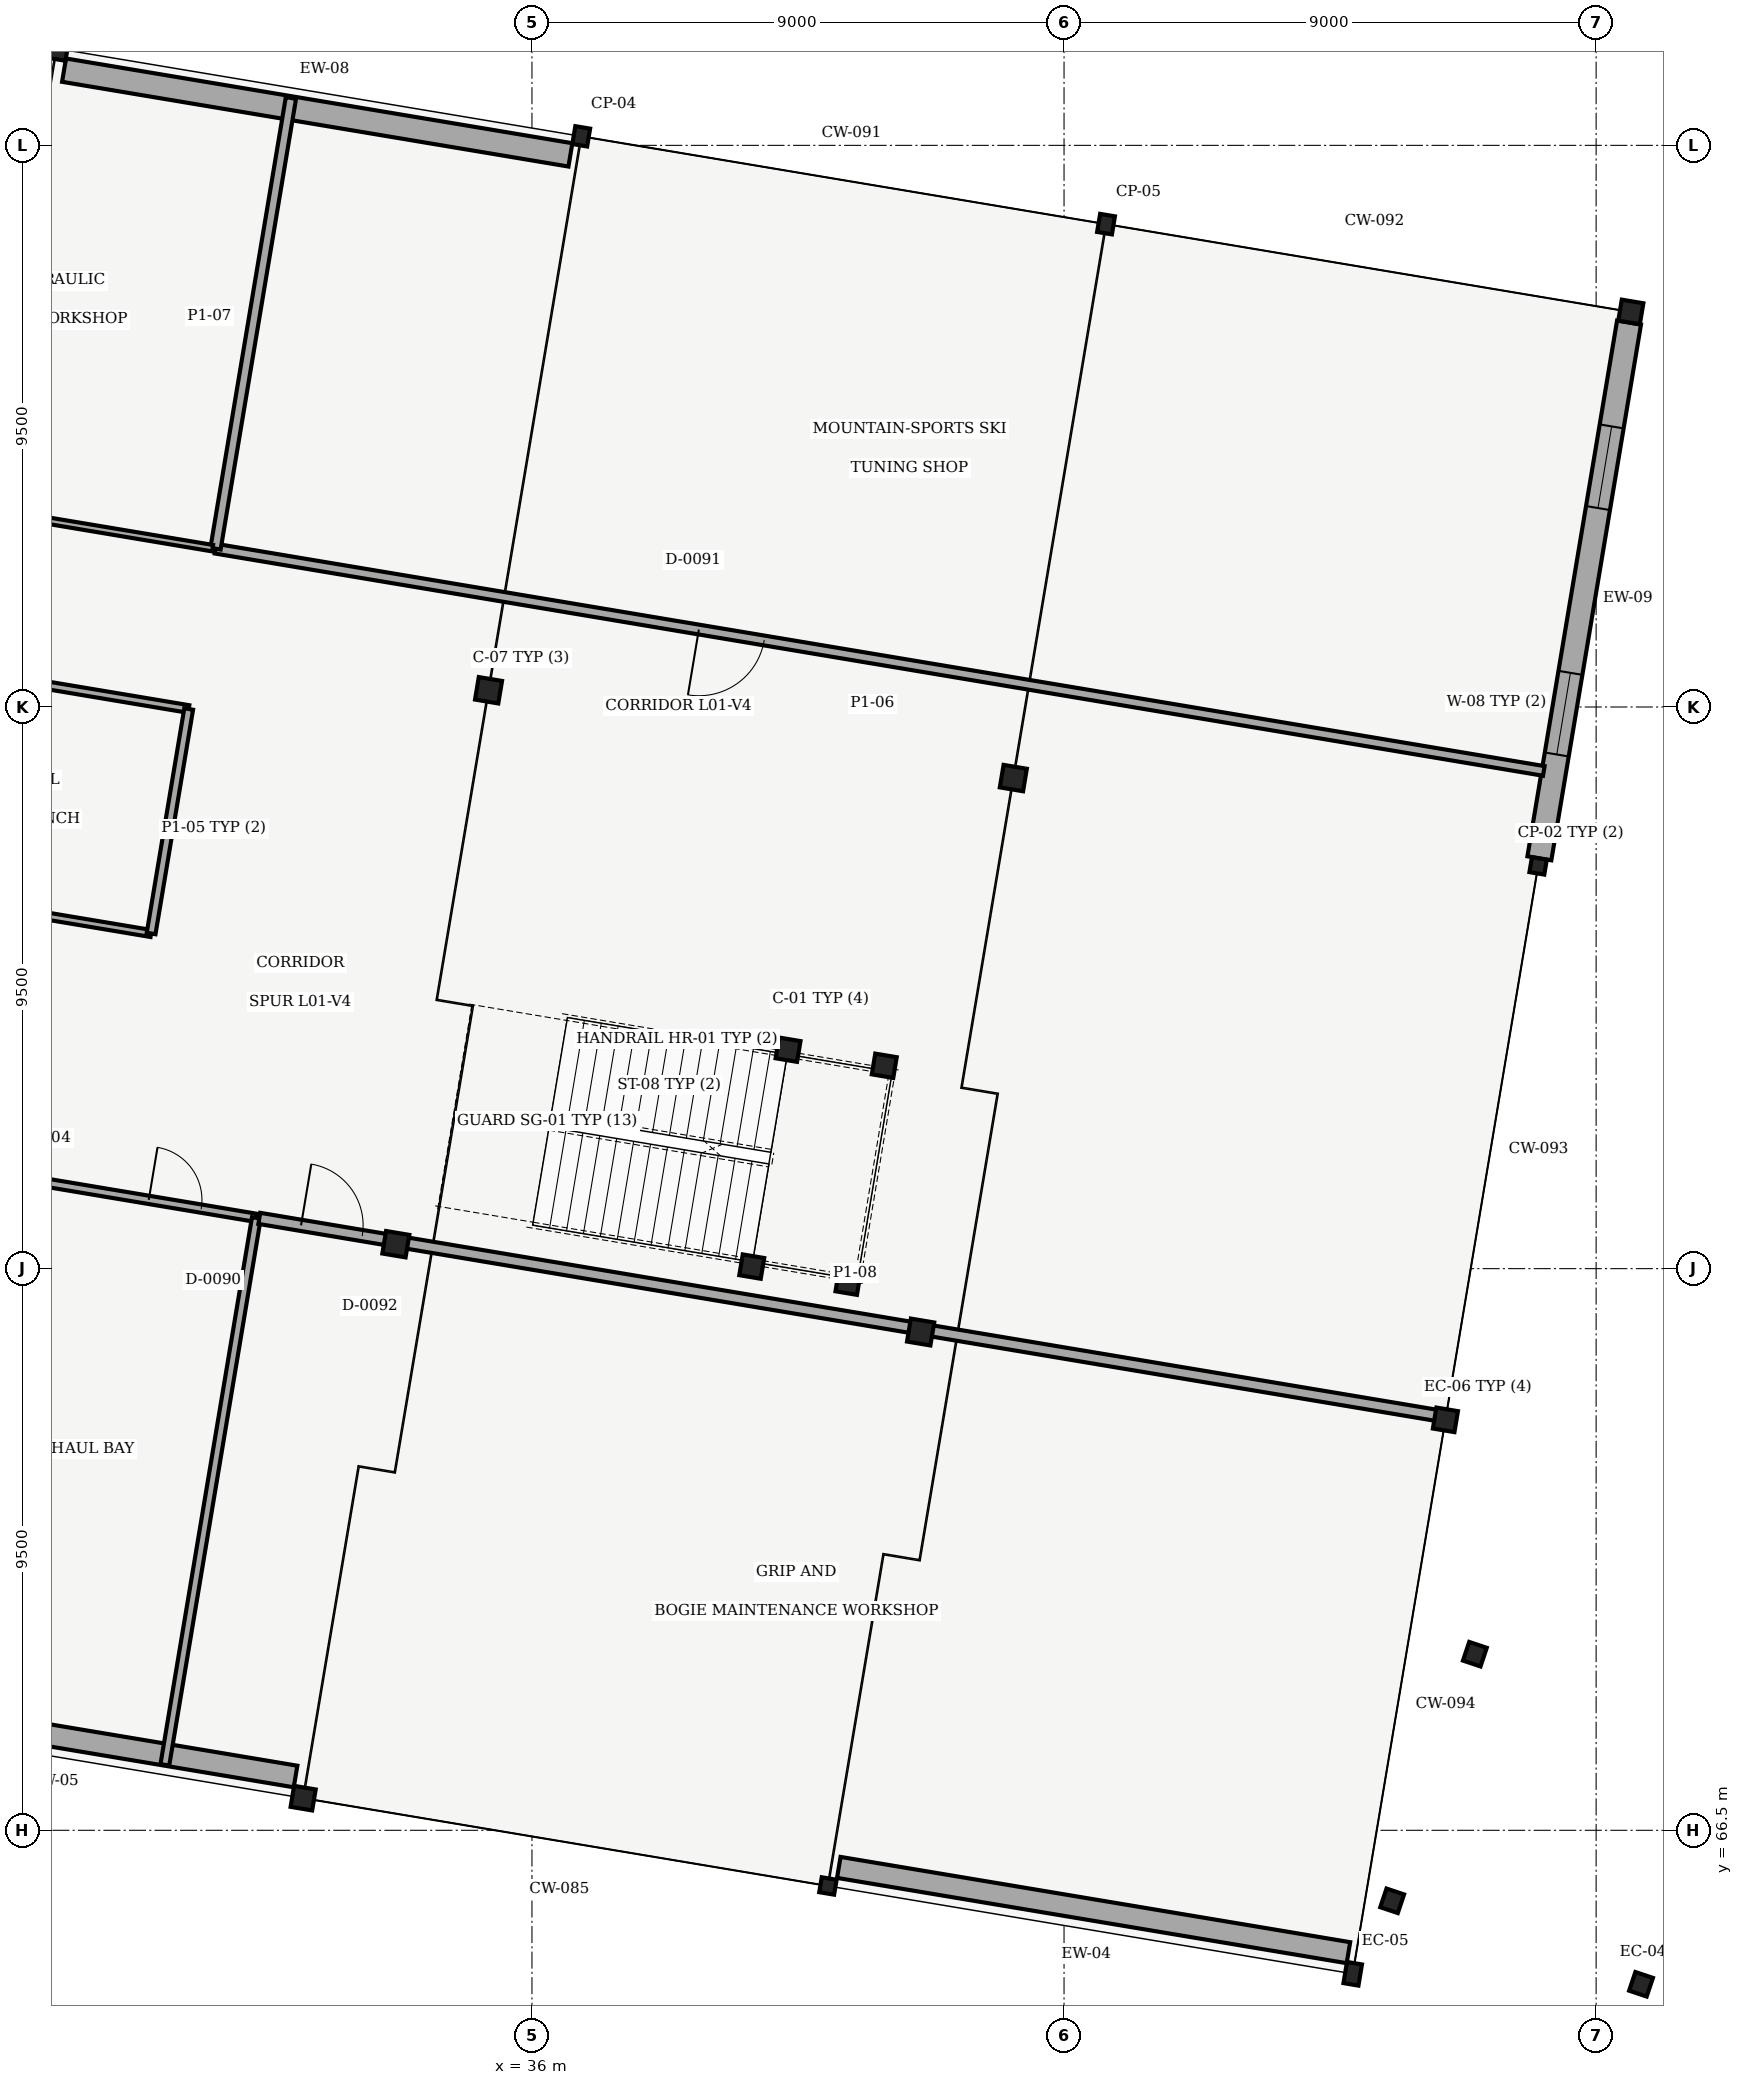
"""IFC4 building model, lengths in metres.
Left out: names, types, materials, properties, quantities, classifications, styles, units other than length and angle.
Written with IfcOpenShell. Run it as: python <this file> out.ifc"""

import sys

from ifc_helpers import new_model, si_unit, direction, frame, frame_2d, origin, origin_with_axes, origin_2d, place, context, subcontext, project, spatial, rectangle, i_section, extrude, element, fill, save


model = new_model("IFC4")
c1 = context("Model", 3, precision=1e-05, world=origin(), true_north=direction((0.0, 1.0)))
c2 = subcontext(c1, "Body", "Model", "MODEL_VIEW")
j1 = project(units=[si_unit("LENGTHUNIT", "METRE"), si_unit("PLANEANGLEUNIT", "RADIAN")], contexts=[c1])
p1 = place(None, origin())
s1 = spatial("IfcSite", under=j1, at=p1, CompositionType="ELEMENT")
p2 = place(p1, origin())
s2 = spatial("IfcBuilding", under=s1, at=p2, CompositionType="ELEMENT")
p3 = place(p2, frame((0.0, 0.0, 4.8)))
s3 = spatial("IfcBuildingStorey", under=s2, at=p3, CompositionType="ELEMENT", Elevation=4.8)
for number, where, z_axis, x_axis in (
    (1, (27.957, 96.638, 0.0), (0.0, 0.0, 1.0), (0.986, -0.165, 0.0)),
    (2, (32.13, 67.044, 0.0), (0.0, 0.0, 1.0), (0.986, -0.165, 0.0)),
):
    element("IfcColumn", number, at=place(p3, frame(where, z_axis=z_axis, x_axis=x_axis)), inside=s3, PredefinedType="COLUMN", context=c2, shape_type="SweptSolid", body=[
        extrude(i_section(OverallWidth=0.37, OverallDepth=0.36, WebThickness=0.012, FlangeThickness=0.02, FilletRadius=0.015, at=origin_2d()), origin(), (0.0, 0.0, 1.0), 4.8),
    ])
for number, where, z_axis, x_axis in (
    (3, (33.698, 76.413, 0.0), (0.0, 0.0, 1.0), (0.986, -0.165, 0.0)),
    (4, (35.266, 85.783, 0.0), (0.0, 0.0, 1.0), (0.986, -0.165, 0.0)),
):
    element("IfcColumn", number, at=place(p3, frame(where, z_axis=z_axis, x_axis=x_axis)), inside=s3, PredefinedType="COLUMN", context=c2, shape_type="SweptSolid", body=[
        extrude(i_section(OverallWidth=0.399, OverallDepth=0.386, WebThickness=0.021, FlangeThickness=0.033, FilletRadius=0.015, at=origin_2d()), origin(), (0.0, 0.0, 1.0), 4.8),
    ])
p4 = place(p3, frame((36.833, 95.153, 0.0), z_axis=(0.0, 0.0, 1.0), x_axis=(0.986285601537, -0.165047605861, 0.0)))
e5 = element("IfcColumn", 5, at=p4, inside=s3, PredefinedType="PILASTER", context=c2, shape_type="SweptSolid", body=[
    extrude(i_section(OverallWidth=0.254, OverallDepth=0.306, WebThickness=0.009, FlangeThickness=0.015, FilletRadius=0.011, at=origin_2d()), origin(), (0.0, 0.0, 1.0), 4.8),
])
p5 = place(p3, frame((41.006, 65.558, 0.0), z_axis=(0.0, 0.0, 1.0), x_axis=(0.986285601537, -0.165047605861, 0.0)))
e6 = element("IfcColumn", 6, at=p5, inside=s3, PredefinedType="PILASTER", context=c2, shape_type="SweptSolid", body=[
    extrude(i_section(OverallWidth=0.255, OverallDepth=0.256, WebThickness=0.01, FlangeThickness=0.016, FilletRadius=0.009, at=origin_2d()), origin(), (0.0, 0.0, 1.0), 4.8),
])
p6 = place(p3, frame((42.574, 74.928, 0.0), z_axis=(0.0, 0.0, 1.0), x_axis=(0.986285601537, -0.165047605861, 0.0)))
e7 = element("IfcColumn", 7, at=p6, inside=s3, PredefinedType="COLUMN", context=c2, shape_type="SweptSolid", body=[
    extrude(i_section(OverallWidth=0.401, OverallDepth=0.394, WebThickness=0.023, FlangeThickness=0.037, FilletRadius=0.015, at=origin_2d()), origin(), (0.0, 0.0, 1.0), 4.8),
])
p7 = place(p3, frame((44.142, 84.298, 0.0), z_axis=(0.0, 0.0, 1.0), x_axis=(0.986285601537, -0.165047605861, 0.0)))
e8 = element("IfcColumn", 8, at=p7, inside=s3, PredefinedType="COLUMN", context=c2, shape_type="SweptSolid", body=[
    extrude(i_section(OverallWidth=0.399, OverallDepth=0.386, WebThickness=0.021, FlangeThickness=0.033, FilletRadius=0.015, at=origin_2d()), origin(), (0.0, 0.0, 1.0), 4.8),
])
p8 = place(p3, frame((45.71, 93.667, 0.0), z_axis=(0.0, 0.0, 1.0), x_axis=(0.986285601537, -0.165047605861, 0.0)))
e9 = element("IfcColumn", 9, at=p8, inside=s3, PredefinedType="PILASTER", context=c2, shape_type="SweptSolid", body=[
    extrude(i_section(OverallWidth=0.254, OverallDepth=0.31, WebThickness=0.009, FlangeThickness=0.016, FilletRadius=0.011, at=origin_2d()), origin(), (0.0, 0.0, 1.0), 4.8),
])
p9 = place(p3, frame((49.883, 64.073, 0.0), z_axis=(0.0, 0.0, 1.0), x_axis=(0.986285601537, -0.165047605861, 0.0)))
e10 = element("IfcColumn", 10, at=p9, inside=s3, PredefinedType="COLUMN", context=c2, shape_type="SweptSolid", body=[
    extrude(i_section(OverallWidth=0.257, OverallDepth=0.363, WebThickness=0.013, FlangeThickness=0.022, FilletRadius=0.015, at=origin_2d()), origin(), (0.0, 0.0, 1.0), 4.8),
])
p10 = place(p3, frame((51.451, 73.443, 0.0), z_axis=(0.0, 0.0, 1.0), x_axis=(0.986285601537, -0.165047605861, 0.0)))
e11 = element("IfcColumn", 11, at=p10, inside=s3, PredefinedType="COLUMN", context=c2, shape_type="SweptSolid", body=[
    extrude(i_section(OverallWidth=0.37, OverallDepth=0.36, WebThickness=0.012, FlangeThickness=0.02, FilletRadius=0.015, at=origin_2d()), origin(), (0.0, 0.0, 1.0), 4.8),
])
p11 = place(p3, frame((53.019, 82.812, 0.0), z_axis=(0.0, 0.0, 1.0), x_axis=(0.986285601537, -0.165047605861, 0.0)))
e12 = element("IfcColumn", 12, at=p11, inside=s3, PredefinedType="PILASTER", context=c2, shape_type="SweptSolid", body=[
    extrude(i_section(OverallWidth=0.255, OverallDepth=0.256, WebThickness=0.01, FlangeThickness=0.016, FilletRadius=0.009, at=origin_2d()), origin(), (0.0, 0.0, 1.0), 4.8),
])
p12 = place(p3, frame((54.587, 92.182, 0.0), z_axis=(0.0, 0.0, 1.0), x_axis=(0.986285601537, -0.165047605861, 0.0)))
e13 = element("IfcColumn", 13, at=p12, inside=s3, PredefinedType="COLUMN", context=c2, shape_type="SweptSolid", body=[
    extrude(i_section(OverallWidth=0.37, OverallDepth=0.36, WebThickness=0.012, FlangeThickness=0.02, FilletRadius=0.015, at=origin_2d()), origin(), (0.0, 0.0, 1.0), 4.8),
])
for number, where, z_axis, x_axis in (
    (14, (50.55, 65.307, 0.0), (0.0, 0.0, 1.0), (0.948, -0.318, 0.0)),
    (15, (51.949, 69.479, 0.0), (0.0, 0.0, 1.0), (0.948, -0.318, 0.0)),
    (16, (54.76, 63.895, 0.0), (0.0, 0.0, 1.0), (0.948, -0.318, 0.0)),
):
    element("IfcColumn", number, at=place(p3, frame(where, z_axis=z_axis, x_axis=x_axis)), inside=s3, PredefinedType="COLUMN", context=c2, shape_type="SweptSolid", body=[
        extrude(i_section(OverallWidth=0.313, OverallDepth=0.333, WebThickness=0.018, FlangeThickness=0.028, FilletRadius=0.013, at=origin_2d()), origin(), (0.0, 0.0, 1.0), 4.8),
    ])
p13 = place(p3, frame((49.81, 64.43, 0.0), z_axis=(0.0, 0.0, 1.0), x_axis=(-0.986283477209, 0.165060299842, 0.0)))
e17 = element("IfcWall", 17, at=p13, inside=s3, PredefinedType="SOLIDWALL", context=c2, shape_type="SweptSolid", body=[
    extrude(rectangle(XDim=8.74, YDim=0.36, at=frame_2d((4.37, 0.0))), origin(), (0.0, 0.0, 1.0), 3.4),
])
p14 = place(p3, frame((32.001, 67.41, 0.0), z_axis=(0.0, 0.0, 1.0), x_axis=(-0.986284271158, 0.165055555699, 0.0)))
e18 = element("IfcWall", 18, at=p14, inside=s3, PredefinedType="SOLIDWALL", context=c2, shape_type="SweptSolid", body=[
    extrude(rectangle(XDim=8.683, YDim=0.37, at=frame_2d((4.341, 0.0))), origin(), (0.0, 0.0, 1.0), 3.4),
])
p15 = place(p3, frame((28.085, 96.272, 0.0), z_axis=(0.0, 0.0, 1.0), x_axis=(0.98628886626, -0.165028095461, 0.0)))
e19 = element("IfcWall", 19, at=p15, inside=s3, PredefinedType="SOLIDWALL", context=c2, shape_type="SweptSolid", body=[
    extrude(rectangle(XDim=8.684, YDim=0.4, at=frame_2d((4.342, 0.0))), origin(), (0.0, 0.0, 1.0), 3.4),
])
p16 = place(p3, frame((54.557, 92.002, 0.0), z_axis=(0.0, 0.0, 1.0), x_axis=(-0.165036673146, -0.986287430984, 0.0)))
e20 = element("IfcWall", 20, at=p16, inside=s3, PredefinedType="SOLIDWALL", context=c2, shape_type="SweptSolid", body=[
    extrude(rectangle(XDim=9.188, YDim=0.41, at=frame_2d((4.594, 0.0))), origin(), (0.0, 0.0, 1.0), 3.4),
])
p17 = place(p16, frame((1.781, 0.0, 0.95)))
e21 = element("IfcOpeningElement", 21, at=p17, cuts=e20, PredefinedType="OPENING", context=c2, shape_type="SweptSolid", body=[
    extrude(rectangle(XDim=1.4, YDim=1.75, at=frame_2d((0.7, 0.875))), frame((0.0, 0.215, 0.0), z_axis=(0.0, -1.0, 0.0), x_axis=(1.0, 0.0, 0.0)), (0.0, 0.0, 1.0), 0.43),
])
p18 = place(p16, frame((6.007, 0.0, 0.95)))
e22 = element("IfcOpeningElement", 22, at=p18, cuts=e20, PredefinedType="OPENING", context=c2, shape_type="SweptSolid", body=[
    extrude(rectangle(XDim=1.4, YDim=1.75, at=frame_2d((0.7, 0.875))), frame((0.0, 0.215, 0.0), z_axis=(0.0, -1.0, 0.0), x_axis=(1.0, 0.0, 0.0)), (0.0, 0.0, 1.0), 0.43),
])
for number, where, z_axis, x_axis in (
    (23, (39.718, 76.035, 0.0), (0.0, 0.0, 1.0), (0.986, -0.165, 0.0)),
    (24, (41.345, 75.762, 0.0), (0.0, 0.0, 1.0), (0.986, -0.165, 0.0)),
    (25, (40.332, 79.704, 0.0), (0.0, 0.0, 1.0), (0.986, -0.165, 0.0)),
    (26, (41.959, 79.431, 0.0), (0.0, 0.0, 1.0), (0.986, -0.165, 0.0)),
):
    element("IfcColumn", number, at=place(p3, frame(where, z_axis=z_axis, x_axis=x_axis)), inside=s3, PredefinedType="COLUMN", context=c2, shape_type="SweptSolid", body=[
        extrude(i_section(OverallWidth=0.368, OverallDepth=0.356, WebThickness=0.011, FlangeThickness=0.018, FilletRadius=0.015, at=origin_2d()), origin(), (0.0, 0.0, 1.0), 2.2),
    ])
p19 = place(p3, frame((7.244, 80.891, 0.0), z_axis=(0.0, 0.0, 1.0), x_axis=(0.986286486683, -0.16504231635, 0.0)))
e27 = element("IfcWall", 27, at=p19, inside=s3, PredefinedType="PARTITIONING", context=c2, shape_type="SweptSolid", body=[
    extrude(rectangle(XDim=24.43, YDim=0.14, at=frame_2d((12.215, 0.0))), origin(), (0.0, 0.0, 1.0), 3.38),
])
p20 = place(p19, frame((22.584, 0.0, 0.0)))
e28 = element("IfcOpeningElement", 28, at=p20, cuts=e27, PredefinedType="OPENING", context=c2, shape_type="SweptSolid", body=[
    extrude(rectangle(XDim=0.9, YDim=2.1, at=frame_2d((0.45, 1.05))), frame((0.0, 0.08, 0.0), z_axis=(0.0, -1.0, 0.0), x_axis=(1.0, 0.0, 0.0)), (0.0, 0.0, 1.0), 0.16),
])
p21 = place(p3, frame((31.339, 76.859, 0.0), z_axis=(0.0, 0.0, 1.0), x_axis=(-0.165040495696, -0.986286791344, 0.0)))
e29 = element("IfcWall", 29, at=p21, inside=s3, PredefinedType="PARTITIONING", context=c2, shape_type="SweptSolid", body=[
    extrude(rectangle(XDim=9.38, YDim=0.15, at=frame_2d((4.69, 0.0))), origin(), (0.0, 0.0, 1.0), 3.38),
])
p22 = place(p3, frame((53.115, 84.418, 0.0), z_axis=(0.0, 0.0, 1.0), x_axis=(-0.986285960274, 0.165045462123, 0.0)))
e30 = element("IfcWall", 30, at=p22, inside=s3, PredefinedType="PARTITIONING", context=c2, shape_type="SweptSolid", body=[
    extrude(rectangle(XDim=22.78, YDim=0.165, at=frame_2d((11.39, 0.0))), origin(), (0.0, 0.0, 1.0), 3.38),
])
p23 = place(p22, frame((13.371, 0.0, 0.0)))
e31 = element("IfcOpeningElement", 31, at=p23, cuts=e30, PredefinedType="OPENING", context=c2, shape_type="SweptSolid", body=[
    extrude(rectangle(XDim=1.12, YDim=2.18, at=frame_2d((0.56, 1.09))), frame((0.0, 0.093, 0.0), z_axis=(0.0, -1.0, 0.0), x_axis=(1.0, 0.0, 0.0)), (0.0, 0.0, 1.0), 0.185),
])
p24 = place(p3, frame((30.647, 88.178, 0.0), z_axis=(0.0, 0.0, 1.0), x_axis=(0.165054518639, 0.98628444471, 0.0)))
e32 = element("IfcWall", 32, at=p24, inside=s3, PredefinedType="PARTITIONING", context=c2, shape_type="SweptSolid", body=[
    extrude(rectangle(XDim=7.73, YDim=0.175, at=frame_2d((3.865, 0.0))), origin(), (0.0, 0.0, 1.0), 3.38),
])
p25 = place(p3, frame((31.388, 76.851, 0.0), z_axis=(0.0, 0.0, 1.0), x_axis=(0.986286465811, -0.16504244108, 0.0)))
e33 = element("IfcWall", 33, at=p25, inside=s3, PredefinedType="PARTITIONING", context=c2, shape_type="SweptSolid", body=[
    extrude(rectangle(XDim=20.18, YDim=0.19, at=frame_2d((10.09, 0.0))), origin(), (0.0, 0.0, 1.0), 3.38),
])
p26 = place(p25, frame((0.716, 0.0, 0.0)))
e34 = element("IfcOpeningElement", 34, at=p26, cuts=e33, PredefinedType="OPENING", context=c2, shape_type="SweptSolid", body=[
    extrude(rectangle(XDim=1.05, YDim=2.2, at=frame_2d((0.525, 1.1))), frame((0.0, 0.105, 0.0), z_axis=(0.0, -1.0, 0.0), x_axis=(1.0, 0.0, 0.0)), (0.0, 0.0, 1.0), 0.21),
])
p27 = place(p3, frame((30.598, 88.187, 0.0), z_axis=(0.0, 0.0, 1.0), x_axis=(-0.986287016704, 0.165039148936, 0.0)))
e35 = element("IfcWall", 35, at=p27, inside=s3, PredefinedType="PARTITIONING", context=c2, shape_type="SweptSolid", body=[
    extrude(rectangle(XDim=21.83, YDim=0.11, at=frame_2d((10.915, 0.0))), origin(), (0.0, 0.0, 1.0), 3.38),
])
p28 = place(p27, frame((7.89, 0.0, 0.0)))
e36 = element("IfcOpeningElement", 36, at=p28, cuts=e35, PredefinedType="OPENING", context=c2, shape_type="SweptSolid", body=[
    extrude(rectangle(XDim=1.22, YDim=2.2, at=frame_2d((0.61, 1.1))), frame((0.0, 0.065, 0.0), z_axis=(0.0, -1.0, 0.0), x_axis=(1.0, 0.0, 0.0)), (0.0, 0.0, 1.0), 0.13),
])
p29 = place(p3, frame((29.558, 81.669, 0.0), z_axis=(0.0, 0.0, 1.0), x_axis=(-0.986285271059, 0.165049580706, 0.0)))
e37 = element("IfcWall", 37, at=p29, inside=s3, PredefinedType="PARTITIONING", context=c2, shape_type="SweptSolid", body=[
    extrude(rectangle(XDim=12.9, YDim=0.12, at=frame_2d((6.45, 0.0))), origin(), (0.0, 0.0, 1.0), 3.38),
])
p30 = place(p3, frame((17.471, 87.595, 0.0), z_axis=(0.0, 0.0, 1.0), x_axis=(0.986284755488, -0.165052661574, 0.0)))
e38 = element("IfcWall", 38, at=p30, inside=s3, PredefinedType="PARTITIONING", context=c2, shape_type="SweptSolid", body=[
    extrude(rectangle(XDim=12.9, YDim=0.13, at=frame_2d((6.45, 0.0))), origin(), (0.0, 0.0, 1.0), 3.38),
])
p31 = place(p30, frame((4.463, 0.0, 0.0)))
e39 = element("IfcOpeningElement", 39, at=p31, cuts=e38, PredefinedType="OPENING", context=c2, shape_type="SweptSolid", body=[
    extrude(rectangle(XDim=1.44, YDim=2.22, at=frame_2d((0.72, 1.11))), frame((0.0, 0.075, 0.0), z_axis=(0.0, -1.0, 0.0), x_axis=(1.0, 0.0, 0.0)), (0.0, 0.0, 1.0), 0.15),
])
p32 = place(p3, frame((30.194, 85.466, 0.0), z_axis=(0.0, 0.0, 1.0), x_axis=(-0.165005682962, -0.986292616108, 0.0)))
e40 = element("IfcWall", 40, at=p32, inside=s3, PredefinedType="PARTITIONING", context=c2, shape_type="SweptSolid", body=[
    extrude(rectangle(XDim=3.85, YDim=0.15, at=frame_2d((1.925, 0.0))), origin(), (0.0, 0.0, 1.0), 3.38),
])
p33 = place(p17, origin_with_axes())
e41 = element("IfcWindow", 41, at=p33, inside=s3, PartitioningType="SINGLE_PANEL", PredefinedType="WINDOW", context=c2, shape_type="SweptSolid", body=[
    extrude(rectangle(XDim=1.4, YDim=1.75, at=frame_2d((0.7, 0.875))), frame((0.0, 0.03, 0.0), z_axis=(0.0, -1.0, 0.0), x_axis=(1.0, 0.0, 0.0)), (0.0, 0.0, 1.0), 0.06),
])
fill(e21, e41)
p34 = place(p18, origin_with_axes())
e42 = element("IfcWindow", 42, at=p34, inside=s3, PartitioningType="SINGLE_PANEL", PredefinedType="WINDOW", context=c2, shape_type="SweptSolid", body=[
    extrude(rectangle(XDim=1.4, YDim=1.75, at=frame_2d((0.7, 0.875))), frame((0.0, 0.03, 0.0), z_axis=(0.0, -1.0, 0.0), x_axis=(1.0, 0.0, 0.0)), (0.0, 0.0, 1.0), 0.06),
])
fill(e22, e42)
p35 = place(p20, origin_with_axes())
e43 = element("IfcDoor", 43, at=p35, inside=s3, OperationType="SINGLE_SWING_LEFT", PredefinedType="DOOR", context=c2, shape_type="SweptSolid", body=[
    extrude(rectangle(XDim=0.9, YDim=2.1, at=frame_2d((0.45, 1.05))), frame((0.0, 0.025, 0.0), z_axis=(0.0, -1.0, 0.0), x_axis=(1.0, 0.0, 0.0)), (0.0, 0.0, 1.0), 0.05),
])
fill(e28, e43)
p36 = place(p23, origin_with_axes())
e44 = element("IfcDoor", 44, at=p36, inside=s3, OperationType="SINGLE_SWING_RIGHT", PredefinedType="DOOR", context=c2, shape_type="SweptSolid", body=[
    extrude(rectangle(XDim=1.12, YDim=2.18, at=frame_2d((0.56, 1.09))), frame((0.0, 0.025, 0.0), z_axis=(0.0, -1.0, 0.0), x_axis=(1.0, 0.0, 0.0)), (0.0, 0.0, 1.0), 0.05),
])
fill(e31, e44)
p37 = place(p26, origin_with_axes())
e45 = element("IfcDoor", 45, at=p37, inside=s3, OperationType="SINGLE_SWING_LEFT", PredefinedType="DOOR", context=c2, shape_type="SweptSolid", body=[
    extrude(rectangle(XDim=1.05, YDim=2.2, at=frame_2d((0.525, 1.1))), frame((0.0, 0.025, 0.0), z_axis=(0.0, -1.0, 0.0), x_axis=(1.0, 0.0, 0.0)), (0.0, 0.0, 1.0), 0.05),
])
fill(e34, e45)
save(model, sys.argv[1])
